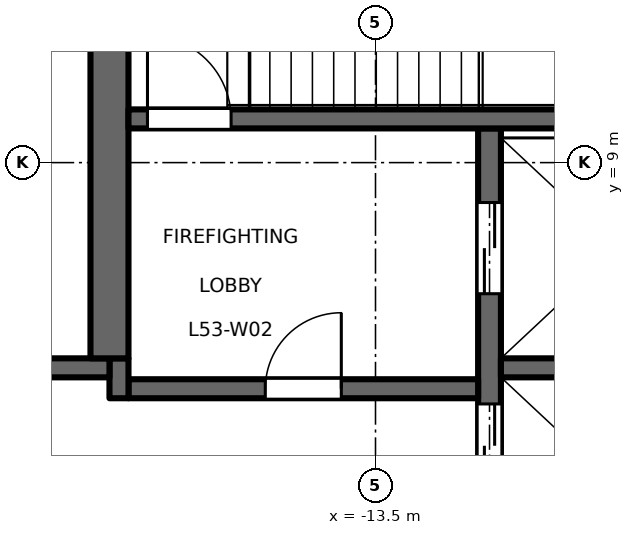
"""IFC4 building model, lengths in metres.
Left out: names, types, materials, properties, quantities, classifications, styles, units other than length and angle.
Written with IfcOpenShell. Run it as: python <this file> out.ifc"""

import sys

from ifc_helpers import new_model, si_unit, direction, frame, frame_2d, origin, place, context, subcontext, project, spatial, rectangle, extrude, element, fill, save


model = new_model("IFC4")
c1 = context("Model", 3, precision=1e-05, world=origin(), true_north=direction((0.0, 1.0)))
c2 = subcontext(c1, "Body", "Model", "MODEL_VIEW")
j1 = project(units=[si_unit("LENGTHUNIT", "METRE"), si_unit("PLANEANGLEUNIT", "RADIAN")], contexts=[c1])
p1 = place(None, origin())
s1 = spatial("IfcSite", under=j1, at=p1, CompositionType="ELEMENT")
p2 = place(p1, origin())
s2 = spatial("IfcBuilding", under=s1, at=p2, CompositionType="ELEMENT")
p3 = place(p2, frame((0.0, 0.0, 246.7)))
s3 = spatial("IfcBuildingStorey", under=s2, at=p3, CompositionType="ELEMENT", Elevation=246.7)
p4 = place(p3, frame((-12.0, -9.45, 0.0), z_axis=(0.0, 0.0, 1.0), x_axis=(0.0, 1.0, 0.0)))
e1 = element("IfcWall", 1, at=p4, inside=s3, PredefinedType="SHEAR", context=c2, shape_type="SweptSolid", body=[
    extrude(rectangle(XDim=18.9, YDim=0.3, at=frame_2d((9.45, 0.0))), origin(), (0.0, 0.0, 1.0), 4.35),
])
p5 = place(p4, frame((4.725, 0.0, 0.0)))
e2 = element("IfcOpeningElement", 2, at=p5, cuts=e1, PredefinedType="OPENING", context=c2, shape_type="SweptSolid", body=[
    extrude(rectangle(XDim=1.1, YDim=2.1, at=frame_2d((0.55, 1.05))), frame((0.0, 0.16, 0.0), z_axis=(0.0, -1.0, 0.0), x_axis=(1.0, 0.0, 0.0)), (0.0, 0.0, 1.0), 0.32),
])
p6 = place(p4, frame((7.875, 0.0, 0.0)))
e3 = element("IfcOpeningElement", 3, at=p6, cuts=e1, PredefinedType="OPENING", context=c2, shape_type="SweptSolid", body=[
    extrude(rectangle(XDim=1.1, YDim=2.1, at=frame_2d((0.55, 1.05))), frame((0.0, 0.16, 0.0), z_axis=(0.0, -1.0, 0.0), x_axis=(1.0, 0.0, 0.0)), (0.0, 0.0, 1.0), 0.32),
])
p7 = place(p4, frame((11.025, 0.0, 0.0)))
e4 = element("IfcOpeningElement", 4, at=p7, cuts=e1, PredefinedType="OPENING", context=c2, shape_type="SweptSolid", body=[
    extrude(rectangle(XDim=1.1, YDim=2.1, at=frame_2d((0.55, 1.05))), frame((0.0, 0.16, 0.0), z_axis=(0.0, -1.0, 0.0), x_axis=(1.0, 0.0, 0.0)), (0.0, 0.0, 1.0), 0.32),
])
p8 = place(p4, frame((14.175, 0.0, 0.0)))
e5 = element("IfcOpeningElement", 5, at=p8, cuts=e1, PredefinedType="OPENING", context=c2, shape_type="SweptSolid", body=[
    extrude(rectangle(XDim=1.1, YDim=2.1, at=frame_2d((0.55, 1.05))), frame((0.0, 0.16, 0.0), z_axis=(0.0, -1.0, 0.0), x_axis=(1.0, 0.0, 0.0)), (0.0, 0.0, 1.0), 0.32),
])
p9 = place(p4, frame((16.725, 0.0, 0.0)))
e6 = element("IfcOpeningElement", 6, at=p9, cuts=e1, PredefinedType="OPENING", context=c2, shape_type="SweptSolid", body=[
    extrude(rectangle(XDim=1.2, YDim=2.1, at=frame_2d((0.6, 1.05))), frame((0.0, 0.16, 0.0), z_axis=(0.0, -1.0, 0.0), x_axis=(1.0, 0.0, 0.0)), (0.0, 0.0, 1.0), 0.32),
])
p10 = place(p4, frame((0.975, 0.0, 0.0)))
e7 = element("IfcOpeningElement", 7, at=p10, cuts=e1, PredefinedType="OPENING", context=c2, shape_type="SweptSolid", body=[
    extrude(rectangle(XDim=1.2, YDim=2.1, at=frame_2d((0.6, 1.05))), frame((0.0, 0.16, 0.0), z_axis=(0.0, -1.0, 0.0), x_axis=(1.0, 0.0, 0.0)), (0.0, 0.0, 1.0), 0.32),
])
p11 = place(p3, frame((-12.15, 6.025, 0.0), z_axis=(0.0, 0.0, 1.0), x_axis=(-1.0, 0.0, 0.0)))
e8 = element("IfcWall", 8, at=p11, inside=s3, PredefinedType="SHEAR", context=c2, shape_type="SweptSolid", body=[
    extrude(rectangle(XDim=4.6, YDim=0.25, at=frame_2d((2.3, 0.0))), origin(), (0.0, 0.0, 1.0), 4.35),
])
p12 = place(p11, frame((1.8, 0.0, 0.0)))
e9 = element("IfcOpeningElement", 9, at=p12, cuts=e8, PredefinedType="OPENING", context=c2, shape_type="SweptSolid", body=[
    extrude(rectangle(XDim=1.0, YDim=2.1, at=frame_2d((0.5, 1.05))), frame((0.0, 0.135, 0.0), z_axis=(0.0, -1.0, 0.0), x_axis=(1.0, 0.0, 0.0)), (0.0, 0.0, 1.0), 0.27),
])
p13 = place(p3, frame((-16.875, 5.9, 0.0), z_axis=(0.0, 0.0, 1.0), x_axis=(0.0, 1.0, 0.0)))
e10 = element("IfcWall", 10, at=p13, inside=s3, PredefinedType="SHEAR", context=c2, shape_type="SweptSolid", body=[
    extrude(rectangle(XDim=0.525, YDim=0.25, at=frame_2d((0.263, 0.0))), origin(), (0.0, 0.0, 1.0), 4.35),
])
p14 = place(p3, frame((-17.0, 6.3, 0.0), z_axis=(0.0, 0.0, 1.0), x_axis=(-1.0, 0.0, 0.0)))
e11 = element("IfcWall", 11, at=p14, inside=s3, PredefinedType="SHEAR", context=c2, shape_type="SweptSolid", body=[
    extrude(rectangle(XDim=4.25, YDim=0.25, at=frame_2d((2.125, 0.0))), origin(), (0.0, 0.0, 1.0), 4.35),
])
p15 = place(p3, frame((-17.0, 6.425, 0.0), z_axis=(0.0, 0.0, 1.0), x_axis=(0.0, 1.0, 0.0)))
e12 = element("IfcWall", 12, at=p15, inside=s3, PredefinedType="SHEAR", context=c2, shape_type="SweptSolid", body=[
    extrude(rectangle(XDim=6.575, YDim=0.5, at=frame_2d((3.288, 0.0))), origin(), (0.0, 0.0, 1.0), 4.35),
])
p16 = place(p3, frame((-8.75, 6.3, 0.0), z_axis=(0.0, 0.0, 1.0), x_axis=(-1.0, 0.0, 0.0)))
e13 = element("IfcWall", 13, at=p16, inside=s3, PredefinedType="SHEAR", context=c2, shape_type="SweptSolid", body=[
    extrude(rectangle(XDim=3.1, YDim=0.25, at=frame_2d((1.55, 0.0))), origin(), (0.0, 0.0, 1.0), 4.35),
])
p17 = place(p3, frame((-8.75, 9.575, 0.0), z_axis=(0.0, 0.0, 1.0), x_axis=(-1.0, 0.0, 0.0)))
e14 = element("IfcWall", 14, at=p17, inside=s3, PredefinedType="SHEAR", context=c2, shape_type="SweptSolid", body=[
    extrude(rectangle(XDim=8.0, YDim=0.25, at=frame_2d((4.0, 0.0))), origin(), (0.0, 0.0, 1.0), 4.35),
])
p18 = place(p17, frame((6.65, 0.0, 0.0)))
e15 = element("IfcOpeningElement", 15, at=p18, cuts=e14, PredefinedType="OPENING", context=c2, shape_type="SweptSolid", body=[
    extrude(rectangle(XDim=1.1, YDim=2.1, at=frame_2d((0.55, 1.05))), frame((0.0, 0.135, 0.0), z_axis=(0.0, -1.0, 0.0), x_axis=(1.0, 0.0, 0.0)), (0.0, 0.0, 1.0), 0.27),
])
p19 = place(p12, origin())
e16 = element("IfcDoor", 16, at=p19, inside=s3, OperationType="SINGLE_SWING_LEFT", PredefinedType="DOOR", context=c2, shape_type="SweptSolid", body=[
    extrude(rectangle(XDim=1.0, YDim=2.1, at=frame_2d((0.5, 1.05))), frame((0.0, 0.025, 0.0), z_axis=(0.0, -1.0, 0.0), x_axis=(1.0, 0.0, 0.0)), (0.0, 0.0, 1.0), 0.05),
])
fill(e9, e16)
p20 = place(p18, origin())
e17 = element("IfcDoor", 17, at=p20, inside=s3, OperationType="SINGLE_SWING_RIGHT", PredefinedType="DOOR", context=c2, shape_type="SweptSolid", body=[
    extrude(rectangle(XDim=1.1, YDim=2.1, at=frame_2d((0.55, 1.05))), frame((0.0, 0.025, 0.0), z_axis=(0.0, -1.0, 0.0), x_axis=(1.0, 0.0, 0.0)), (0.0, 0.0, 1.0), 0.05),
])
fill(e15, e17)
p21 = place(p8, origin())
e18 = element("IfcDoor", 18, at=p21, inside=s3, OperationType="DOUBLE_DOOR_SLIDING", PredefinedType="DOOR", context=c2, shape_type="SweptSolid", body=[
    extrude(rectangle(XDim=1.1, YDim=2.1, at=frame_2d((0.55, 1.05))), frame((0.0, 0.025, 0.0), z_axis=(0.0, -1.0, 0.0), x_axis=(1.0, 0.0, 0.0)), (0.0, 0.0, 1.0), 0.05),
])
fill(e5, e18)
p22 = place(p9, origin())
e19 = element("IfcDoor", 19, at=p22, inside=s3, OperationType="DOUBLE_DOOR_SLIDING", PredefinedType="DOOR", context=c2, shape_type="SweptSolid", body=[
    extrude(rectangle(XDim=1.2, YDim=2.1, at=frame_2d((0.6, 1.05))), frame((0.0, 0.025, 0.0), z_axis=(0.0, -1.0, 0.0), x_axis=(1.0, 0.0, 0.0)), (0.0, 0.0, 1.0), 0.05),
])
fill(e6, e19)
save(model, sys.argv[1])
